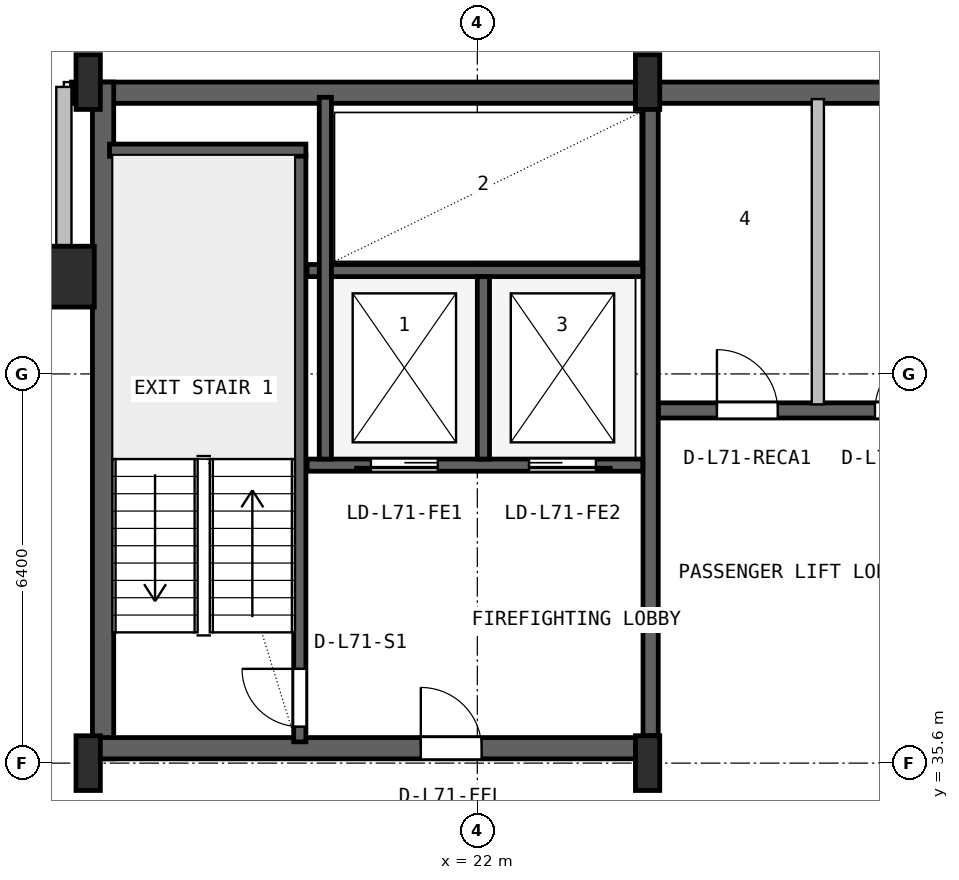
"""IFC4 building model, lengths in metres.
Left out: names, types, materials, properties, quantities, classifications, styles, units other than length and angle.
Written with IfcOpenShell. Run it as: python <this file> out.ifc"""

import sys

from ifc_helpers import new_model, si_unit, direction, frame, frame_2d, origin, origin_2d, place, context, subcontext, project, spatial, rectangle, hollow_rectangle, i_section, extrude, source, transform, mapped, element, fill, save


model = new_model("IFC4")
c1 = context("Model", 3, precision=1e-05, world=origin(), true_north=direction((0.0, 1.0)))
c2 = subcontext(c1, "Body", "Model", "MODEL_VIEW")
j1 = project(units=[si_unit("LENGTHUNIT", "METRE"), si_unit("PLANEANGLEUNIT", "RADIAN")], contexts=[c1])
p1 = place(None, origin())
s1 = spatial("IfcSite", under=j1, at=p1, CompositionType="ELEMENT")
p2 = place(p1, origin())
s2 = spatial("IfcBuilding", under=s1, at=p2, CompositionType="ELEMENT")
p3 = place(p2, frame((0.0, 0.0, 285.0)))
s3 = spatial("IfcBuildingStorey", under=s2, at=p3, CompositionType="ELEMENT", Elevation=285.0)
p4 = place(p3, frame((15.325, 46.625, 0.0), z_axis=(0.0, 0.0, 1.0), x_axis=(1.0, 0.0, 0.0)))
e1 = element("IfcWall", 1, at=p4, inside=s3, PredefinedType="SHEAR", context=c2, shape_type="SweptSolid", body=[
    extrude(rectangle(XDim=37.35, YDim=0.35, at=frame_2d((18.675, 0.0))), origin(), (0.0, 0.0, 1.0), 3.55),
])
p5 = place(p3, frame((15.845, 35.67, 0.0), z_axis=(0.0, 0.0, 1.0), x_axis=(0.0, 1.0, 0.0)))
e2 = element("IfcWall", 2, at=p5, inside=s3, PredefinedType="SHEAR", context=c2, shape_type="SweptSolid", body=[
    extrude(rectangle(XDim=11.13, YDim=0.35, at=frame_2d((5.565, 0.0))), origin(), (0.0, 0.0, 1.0), 3.55),
])
p6 = place(p3, frame((15.67, 35.845, 0.0), z_axis=(0.0, 0.0, 1.0), x_axis=(1.0, 0.0, 0.0)))
e3 = element("IfcWall", 3, at=p6, inside=s3, PredefinedType="SHEAR", context=c2, shape_type="SweptSolid", body=[
    extrude(rectangle(XDim=9.13, YDim=0.35, at=frame_2d((4.565, 0.0))), origin(), (0.0, 0.0, 1.0), 3.55),
])
p7 = place(p6, frame((5.4, 0.0, 0.0)))
e4 = element("IfcOpeningElement", 4, at=p7, cuts=e3, PredefinedType="OPENING", context=c2, shape_type="SweptSolid", body=[
    extrude(rectangle(XDim=1.0, YDim=2.1, at=frame_2d((0.5, 1.05))), frame((0.0, 0.185, 0.0), z_axis=(0.0, -1.0, 0.0), x_axis=(1.0, 0.0, 0.0)), (0.0, 0.0, 1.0), 0.37),
])
m1 = source(origin(), c2, "Body", "SweptSolid", [
    extrude(i_section(OverallWidth=0.4, OverallDepth=0.9, WebThickness=0.016, FlangeThickness=0.028, FilletRadius=0.016, at=origin_2d()), origin(), (0.0, 0.0, 1.0), 3.8),
])
for number, where, z_axis, x_axis in (
    (5, (15.6, 35.6, 0.0), (0.0, 0.0, 1.0), (1.0, 0.0, 0.0)),
    (6, (15.6, 46.8, 0.0), (0.0, 0.0, 1.0), (1.0, 0.0, 0.0)),
    (7, (24.8, 35.6, 0.0), (0.0, 0.0, 1.0), (1.0, 0.0, 0.0)),
    (8, (24.8, 46.8, 0.0), (0.0, 0.0, 1.0), (1.0, 0.0, 0.0)),
):
    element("IfcColumn", number, at=place(p3, frame(where, z_axis=z_axis, x_axis=x_axis)), inside=s3, PredefinedType="COLUMN", context=c2, shape_type="MappedRepresentation", body=[
        mapped(m1, transform((0.0, 0.0, 0.0), x_axis=(1.0, 0.0, 0.0), y_axis=(0.0, 1.0, 0.0), z_axis=(0.0, 0.0, 1.0), scale=1.0)),
    ])
m2 = source(origin(), c2, "Body", "SweptSolid", [
    extrude(hollow_rectangle(XDim=1.0, YDim=1.0, WallThickness=0.04, at=origin_2d()), origin(), (0.0, 0.0, 1.0), 3.8),
])
p8 = place(p3, frame((15.2, 43.6, 0.0), z_axis=(0.0, 0.0, 1.0), x_axis=(1.0, 0.0, 0.0)))
e9 = element("IfcColumn", 9, at=p8, inside=s3, PredefinedType="COLUMN", context=c2, shape_type="MappedRepresentation", body=[
    mapped(m2, transform((0.0, 0.0, 0.0), x_axis=(1.0, 0.0, 0.0), y_axis=(0.0, 1.0, 0.0), z_axis=(0.0, 0.0, 1.0), scale=1.0)),
])
p9 = place(p3, frame((12.08, 43.6, 0.0), z_axis=(0.0, 0.0, 1.0), x_axis=(1.0, 0.0, 0.0)))
e10 = element("IfcWall", 10, at=p9, inside=s3, PredefinedType="SOLIDWALL", context=c2, shape_type="SweptSolid", body=[
    extrude(rectangle(XDim=2.99, YDim=0.25, at=frame_2d((1.495, 0.0))), origin(), (0.0, 0.0, 1.0), 3.53),
])
p10 = place(p3, frame((15.2, 43.52, 0.0), z_axis=(0.0, 0.0, 1.0), x_axis=(0.0, 1.0, 0.0)))
e11 = element("IfcWall", 11, at=p10, inside=s3, PredefinedType="SOLIDWALL", context=c2, shape_type="SweptSolid", body=[
    extrude(rectangle(XDim=3.2, YDim=0.25, at=frame_2d((1.6, 0.0))), origin(), (0.0, 0.0, 1.0), 3.171),
])
p11 = place(p3, frame((19.08, 35.95, 0.0), z_axis=(0.0, 0.0, 1.0), x_axis=(0.0, 1.0, 0.0)))
e12 = element("IfcWall", 12, at=p11, inside=s3, PredefinedType="SHEAR", context=c2, shape_type="SweptSolid", body=[
    extrude(rectangle(XDim=9.65, YDim=0.2, at=frame_2d((4.825, 0.0))), origin(), (0.0, 0.0, 1.0), 3.55),
])
p12 = place(p11, frame((0.25, 0.0, 0.0)))
e13 = element("IfcOpeningElement", 13, at=p12, cuts=e12, PredefinedType="OPENING", context=c2, shape_type="SweptSolid", body=[
    extrude(rectangle(XDim=0.95, YDim=2.1, at=frame_2d((0.475, 1.05))), frame((0.0, 0.11, 0.0), z_axis=(0.0, -1.0, 0.0), x_axis=(1.0, 0.0, 0.0)), (0.0, 0.0, 1.0), 0.22),
])
p13 = place(p3, frame((15.95, 45.68, 0.0), z_axis=(0.0, 0.0, 1.0), x_axis=(1.0, 0.0, 0.0)))
e14 = element("IfcWall", 14, at=p13, inside=s3, PredefinedType="SHEAR", context=c2, shape_type="SweptSolid", body=[
    extrude(rectangle(XDim=3.23, YDim=0.2, at=frame_2d((1.615, 0.0))), origin(), (0.0, 0.0, 1.0), 3.55),
])
p14 = place(p3, frame((24.85, 36.05, 0.0), z_axis=(0.0, 0.0, 1.0), x_axis=(0.0, 1.0, 0.0)))
e15 = element("IfcWall", 15, at=p14, inside=s3, PredefinedType="SHEAR", context=c2, shape_type="SweptSolid", body=[
    extrude(rectangle(XDim=10.45, YDim=0.25, at=frame_2d((5.225, 0.0))), origin(), (0.0, 0.0, 1.0), 3.55),
])
p15 = place(p3, frame((19.2, 40.5, 0.0), z_axis=(0.0, 0.0, 1.0), x_axis=(1.0, 0.0, 0.0)))
e16 = element("IfcWall", 16, at=p15, inside=s3, PredefinedType="SHEAR", context=c2, shape_type="SweptSolid", body=[
    extrude(rectangle(XDim=5.52, YDim=0.2, at=frame_2d((2.76, 0.0))), origin(), (0.0, 0.0, 1.0), 3.55),
])
p16 = place(p15, frame((1.05, 0.0, 0.0)))
e17 = element("IfcOpeningElement", 17, at=p16, cuts=e16, PredefinedType="OPENING", context=c2, shape_type="SweptSolid", body=[
    extrude(rectangle(XDim=1.1, YDim=2.18, at=frame_2d((0.55, 1.09))), frame((0.0, 0.11, 0.0), z_axis=(0.0, -1.0, 0.0), x_axis=(1.0, 0.0, 0.0)), (0.0, 0.0, 1.0), 0.22),
])
p17 = place(p15, frame((3.65, 0.0, 0.0)))
e18 = element("IfcOpeningElement", 18, at=p17, cuts=e16, PredefinedType="OPENING", context=c2, shape_type="SweptSolid", body=[
    extrude(rectangle(XDim=1.1, YDim=2.18, at=frame_2d((0.55, 1.09))), frame((0.0, 0.11, 0.0), z_axis=(0.0, -1.0, 0.0), x_axis=(1.0, 0.0, 0.0)), (0.0, 0.0, 1.0), 0.22),
])
p18 = place(p3, frame((19.2, 43.7, 0.0), z_axis=(0.0, 0.0, 1.0), x_axis=(1.0, 0.0, 0.0)))
e19 = element("IfcWall", 19, at=p18, inside=s3, PredefinedType="SHEAR", context=c2, shape_type="SweptSolid", body=[
    extrude(rectangle(XDim=5.52, YDim=0.2, at=frame_2d((2.76, 0.0))), origin(), (0.0, 0.0, 1.0), 3.55),
])
p19 = place(p3, frame((22.1, 40.6, 0.0), z_axis=(0.0, 0.0, 1.0), x_axis=(0.0, 1.0, 0.0)))
e20 = element("IfcWall", 20, at=p19, inside=s3, PredefinedType="SHEAR", context=c2, shape_type="SweptSolid", body=[
    extrude(rectangle(XDim=3.0, YDim=0.2, at=frame_2d((1.5, 0.0))), origin(), (0.0, 0.0, 1.0), 3.55),
])
p20 = place(p3, frame((19.5, 40.6, 0.0), z_axis=(0.0, 0.0, 1.0), x_axis=(0.0, 1.0, 0.0)))
e21 = element("IfcWall", 21, at=p20, inside=s3, PredefinedType="SHEAR", context=c2, shape_type="SweptSolid", body=[
    extrude(rectangle(XDim=5.95, YDim=0.2, at=frame_2d((2.975, 0.0))), origin(), (0.0, 0.0, 1.0), 3.55),
])
p21 = place(p3, frame((24.98, 41.4, 0.0), z_axis=(0.0, 0.0, 1.0), x_axis=(1.0, 0.0, 0.0)))
e22 = element("IfcWall", 22, at=p21, inside=s3, PredefinedType="SHEAR", context=c2, shape_type="SweptSolid", body=[
    extrude(rectangle(XDim=23.82, YDim=0.25, at=frame_2d((11.91, 0.0))), origin(), (0.0, 0.0, 1.0), 3.55),
])
p22 = place(p21, frame((16.87, 0.0, 0.0)))
e23 = element("IfcOpeningElement", 23, at=p22, cuts=e22, PredefinedType="OPENING", context=c2, shape_type="SweptSolid", body=[
    extrude(rectangle(XDim=1.1, YDim=2.18, at=frame_2d((0.55, 1.09))), frame((0.0, 0.135, 0.0), z_axis=(0.0, -1.0, 0.0), x_axis=(1.0, 0.0, 0.0)), (0.0, 0.0, 1.0), 0.27),
])
p23 = place(p21, frame((19.47, 0.0, 0.0)))
e24 = element("IfcOpeningElement", 24, at=p23, cuts=e22, PredefinedType="OPENING", context=c2, shape_type="SweptSolid", body=[
    extrude(rectangle(XDim=1.1, YDim=2.18, at=frame_2d((0.55, 1.09))), frame((0.0, 0.135, 0.0), z_axis=(0.0, -1.0, 0.0), x_axis=(1.0, 0.0, 0.0)), (0.0, 0.0, 1.0), 0.27),
])
p24 = place(p21, frame((22.07, 0.0, 0.0)))
e25 = element("IfcOpeningElement", 25, at=p24, cuts=e22, PredefinedType="OPENING", context=c2, shape_type="SweptSolid", body=[
    extrude(rectangle(XDim=1.1, YDim=2.18, at=frame_2d((0.55, 1.09))), frame((0.0, 0.135, 0.0), z_axis=(0.0, -1.0, 0.0), x_axis=(1.0, 0.0, 0.0)), (0.0, 0.0, 1.0), 0.27),
])
p25 = place(p21, frame((0.96, 0.0, 0.0)))
e26 = element("IfcOpeningElement", 26, at=p25, cuts=e22, PredefinedType="OPENING", context=c2, shape_type="SweptSolid", body=[
    extrude(rectangle(XDim=1.0, YDim=2.08, at=frame_2d((0.5, 1.04))), frame((0.0, 0.135, 0.0), z_axis=(0.0, -1.0, 0.0), x_axis=(1.0, 0.0, 0.0)), (0.0, 0.0, 1.0), 0.27),
])
p26 = place(p21, frame((3.56, 0.0, 0.0)))
e27 = element("IfcOpeningElement", 27, at=p26, cuts=e22, PredefinedType="OPENING", context=c2, shape_type="SweptSolid", body=[
    extrude(rectangle(XDim=1.0, YDim=2.08, at=frame_2d((0.5, 1.04))), frame((0.0, 0.135, 0.0), z_axis=(0.0, -1.0, 0.0), x_axis=(1.0, 0.0, 0.0)), (0.0, 0.0, 1.0), 0.27),
])
p27 = place(p21, frame((6.16, 0.0, 0.0)))
e28 = element("IfcOpeningElement", 28, at=p27, cuts=e22, PredefinedType="OPENING", context=c2, shape_type="SweptSolid", body=[
    extrude(rectangle(XDim=0.92, YDim=2.08, at=frame_2d((0.46, 1.04))), frame((0.0, 0.135, 0.0), z_axis=(0.0, -1.0, 0.0), x_axis=(1.0, 0.0, 0.0)), (0.0, 0.0, 1.0), 0.27),
])
p28 = place(p21, frame((11.56, 0.0, 0.0)))
e29 = element("IfcOpeningElement", 29, at=p28, cuts=e22, PredefinedType="OPENING", context=c2, shape_type="SweptSolid", body=[
    extrude(rectangle(XDim=1.0, YDim=2.08, at=frame_2d((0.5, 1.04))), frame((0.0, 0.135, 0.0), z_axis=(0.0, -1.0, 0.0), x_axis=(1.0, 0.0, 0.0)), (0.0, 0.0, 1.0), 0.27),
])
p29 = place(p3, frame((27.6, 41.5, 0.0), z_axis=(0.0, 0.0, 1.0), x_axis=(0.0, 1.0, 0.0)))
e30 = element("IfcWall", 30, at=p29, inside=s3, PredefinedType="SOLIDWALL", context=c2, shape_type="SweptSolid", body=[
    extrude(rectangle(XDim=5.02, YDim=0.2, at=frame_2d((2.51, 0.0))), origin(), (0.0, 0.0, 1.0), 3.53),
])
m3 = source(origin(), c2, "Body", "SweptSolid", [
    extrude(rectangle(XDim=0.95, YDim=2.1, at=frame_2d((0.475, 1.05))), frame((0.0, 0.025, 0.0), z_axis=(0.0, -1.0, 0.0), x_axis=(1.0, 0.0, 0.0)), (0.0, 0.0, 1.0), 0.05),
])
p30 = place(p12, origin())
e31 = element("IfcDoor", 31, at=p30, inside=s3, OperationType="SINGLE_SWING_RIGHT", PredefinedType="DOOR", context=c2, shape_type="MappedRepresentation", body=[
    mapped(m3, transform((0.0, 0.0, 0.0), x_axis=(1.0, 0.0, 0.0), y_axis=(0.0, 1.0, 0.0), z_axis=(0.0, 0.0, 1.0), scale=1.0)),
])
fill(e13, e31)
m4 = source(origin(), c2, "Body", "SweptSolid", [
    extrude(rectangle(XDim=1.0, YDim=2.1, at=frame_2d((0.5, 1.05))), frame((0.0, 0.025, 0.0), z_axis=(0.0, -1.0, 0.0), x_axis=(1.0, 0.0, 0.0)), (0.0, 0.0, 1.0), 0.05),
])
p31 = place(p7, origin())
e32 = element("IfcDoor", 32, at=p31, inside=s3, OperationType="SINGLE_SWING_LEFT", PredefinedType="DOOR", context=c2, shape_type="MappedRepresentation", body=[
    mapped(m4, transform((0.0, 0.0, 0.0), x_axis=(1.0, 0.0, 0.0), y_axis=(0.0, 1.0, 0.0), z_axis=(0.0, 0.0, 1.0), scale=1.0)),
])
fill(e4, e32)
m5 = source(origin(), c2, "Body", "SweptSolid", [
    extrude(rectangle(XDim=1.1, YDim=2.18, at=frame_2d((0.55, 1.09))), frame((0.0, 0.025, 0.0), z_axis=(0.0, -1.0, 0.0), x_axis=(1.0, 0.0, 0.0)), (0.0, 0.0, 1.0), 0.05),
])
p32 = place(p16, frame((1.1, 0.0, 0.0), z_axis=(0.0, 0.0, 1.0), x_axis=(-1.0, 0.0, 0.0)))
e33 = element("IfcDoor", 33, at=p32, inside=s3, OperationType="SLIDING_TO_LEFT", PredefinedType="DOOR", context=c2, shape_type="MappedRepresentation", body=[
    mapped(m5, transform((0.0, 0.0, 0.0), x_axis=(1.0, 0.0, 0.0), y_axis=(0.0, 1.0, 0.0), z_axis=(0.0, 0.0, 1.0), scale=1.0)),
])
fill(e17, e33)
p33 = place(p17, frame((1.1, 0.0, 0.0), z_axis=(0.0, 0.0, 1.0), x_axis=(-1.0, 0.0, 0.0)))
e34 = element("IfcDoor", 34, at=p33, inside=s3, OperationType="SLIDING_TO_RIGHT", PredefinedType="DOOR", context=c2, shape_type="MappedRepresentation", body=[
    mapped(m5, transform((0.0, 0.0, 0.0), x_axis=(1.0, 0.0, 0.0), y_axis=(0.0, 1.0, 0.0), z_axis=(0.0, 0.0, 1.0), scale=1.0)),
])
fill(e18, e34)
m6 = source(origin(), c2, "Body", "SweptSolid", [
    extrude(rectangle(XDim=1.0, YDim=2.08, at=frame_2d((0.5, 1.04))), frame((0.0, 0.025, 0.0), z_axis=(0.0, -1.0, 0.0), x_axis=(1.0, 0.0, 0.0)), (0.0, 0.0, 1.0), 0.05),
])
p34 = place(p25, origin())
e35 = element("IfcDoor", 35, at=p34, inside=s3, OperationType="SINGLE_SWING_LEFT", PredefinedType="DOOR", context=c2, shape_type="MappedRepresentation", body=[
    mapped(m6, transform((0.0, 0.0, 0.0), x_axis=(1.0, 0.0, 0.0), y_axis=(0.0, 1.0, 0.0), z_axis=(0.0, 0.0, 1.0), scale=1.0)),
])
fill(e26, e35)
p35 = place(p26, origin())
e36 = element("IfcDoor", 36, at=p35, inside=s3, OperationType="SINGLE_SWING_RIGHT", PredefinedType="DOOR", context=c2, shape_type="MappedRepresentation", body=[
    mapped(m6, transform((0.0, 0.0, 0.0), x_axis=(1.0, 0.0, 0.0), y_axis=(0.0, 1.0, 0.0), z_axis=(0.0, 0.0, 1.0), scale=1.0)),
])
fill(e27, e36)
save(model, sys.argv[1])
